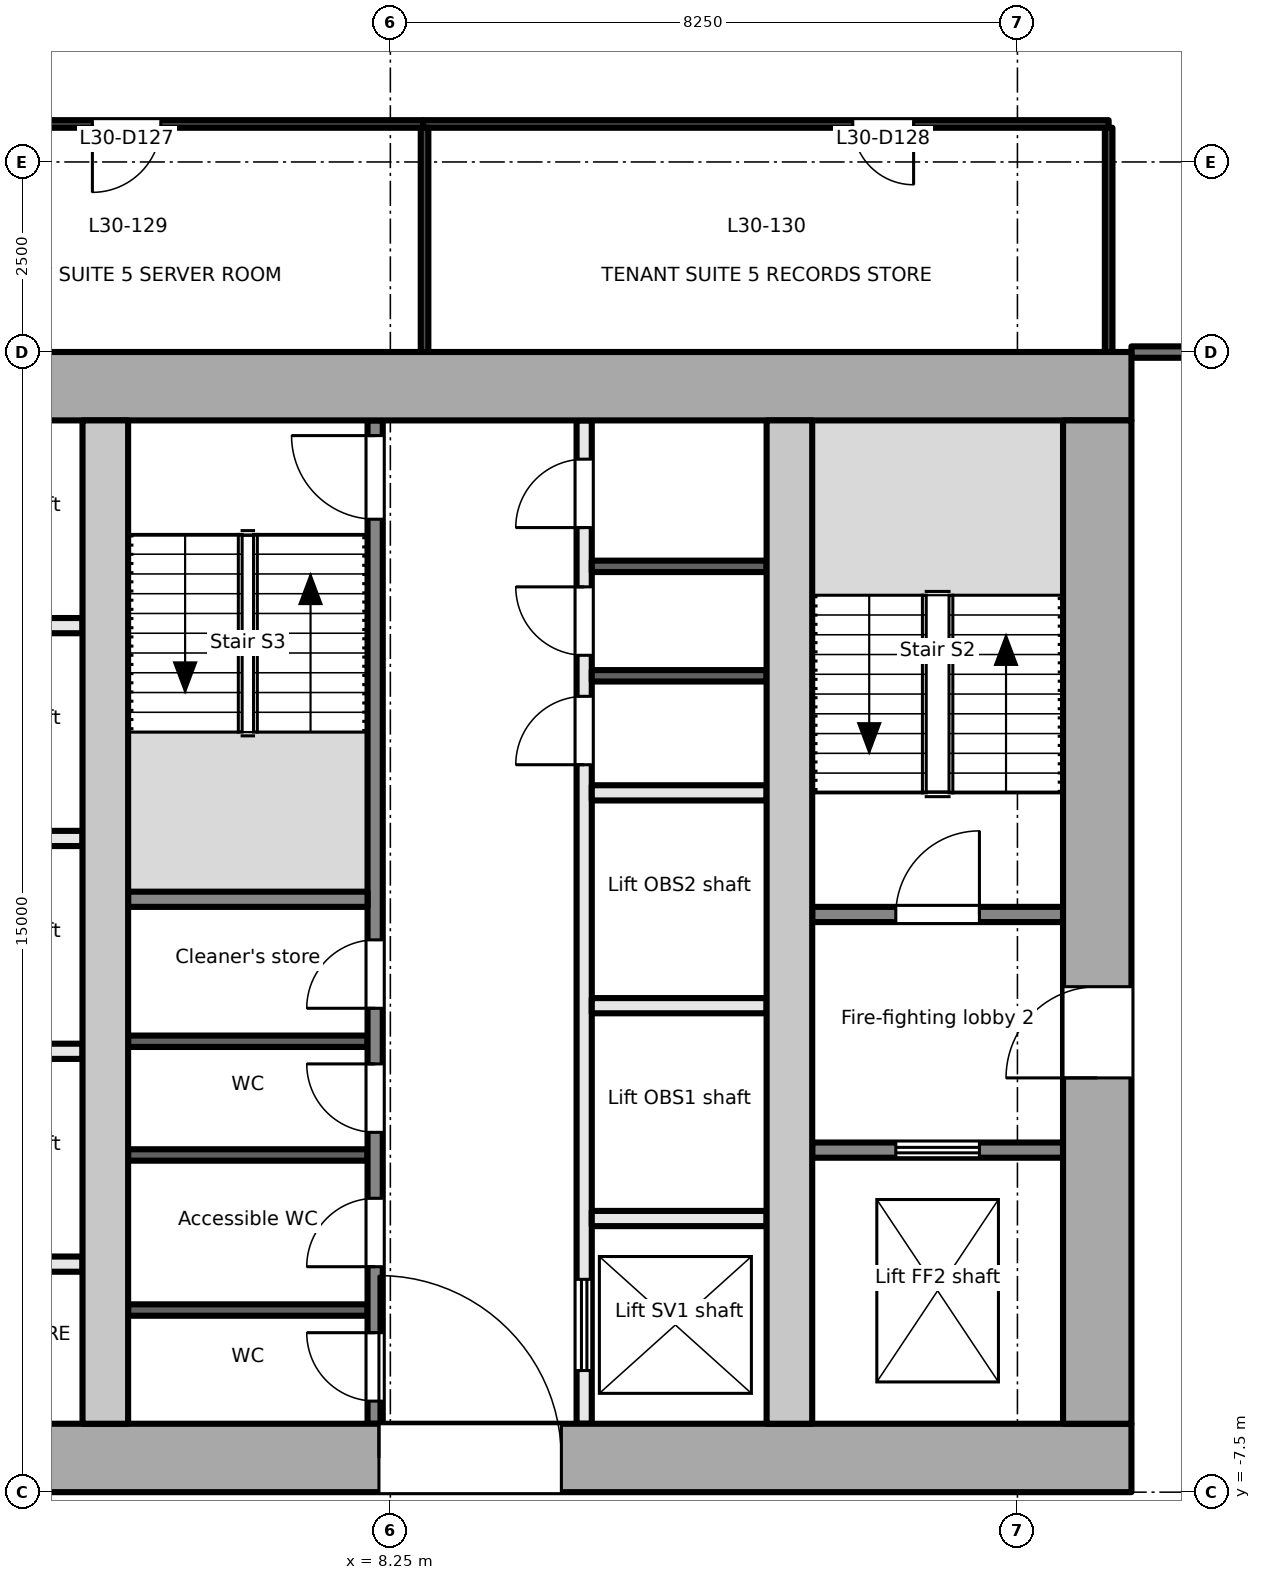
"""IFC4 building model, lengths in metres.
Left out: names, types, materials, properties, quantities, classifications, styles, units other than length and angle.
Written with IfcOpenShell. Run it as: python <this file> out.ifc"""

import sys

from ifc_helpers import new_model, si_unit, direction, frame, frame_2d, origin, place, context, subcontext, project, spatial, rectangle, extrude, element, fill, save


model = new_model("IFC4")
c1 = context("Model", 3, precision=1e-05, world=origin(), true_north=direction((0.0, 1.0)))
c2 = subcontext(c1, "Body", "Model", "MODEL_VIEW")
j1 = project(units=[si_unit("LENGTHUNIT", "METRE"), si_unit("PLANEANGLEUNIT", "RADIAN")], contexts=[c1])
p1 = place(None, origin())
s1 = spatial("IfcSite", under=j1, at=p1, CompositionType="ELEMENT")
p2 = place(p1, origin())
s2 = spatial("IfcBuilding", under=s1, at=p2, CompositionType="ELEMENT")
p3 = place(p2, frame((0.0, 0.0, 134.1)))
s3 = spatial("IfcBuildingStorey", under=s2, at=p3, CompositionType="ELEMENT", Elevation=134.1)
p4 = place(p3, frame((-18.0, -7.05, -0.2), z_axis=(0.0, 0.0, 1.0), x_axis=(1.0, 0.0, 0.0)))
e1 = element("IfcWall", 1, at=p4, inside=s3, PredefinedType="SHEAR", context=c2, shape_type="SweptSolid", body=[
    extrude(rectangle(XDim=36.0, YDim=0.9, at=frame_2d((18.0, 0.0))), origin(), (0.0, 0.0, 1.0), 4.0),
])
p5 = place(p4, frame((7.8, 0.0, 0.2)))
e2 = element("IfcOpeningElement", 2, at=p5, cuts=e1, PredefinedType="OPENING", context=c2, shape_type="SweptSolid", body=[
    extrude(rectangle(XDim=2.4, YDim=2.1, at=frame_2d((1.2, 1.05))), frame((0.0, 0.46, 0.0), z_axis=(0.0, -1.0, 0.0), x_axis=(1.0, 0.0, 0.0)), (0.0, 0.0, 1.0), 0.921),
])
p6 = place(p4, frame((17.4, 0.0, 0.2)))
e3 = element("IfcOpeningElement", 3, at=p6, cuts=e1, PredefinedType="OPENING", context=c2, shape_type="SweptSolid", body=[
    extrude(rectangle(XDim=1.2, YDim=2.1, at=frame_2d((0.6, 1.05))), frame((0.0, 0.46, 0.0), z_axis=(0.0, -1.0, 0.0), x_axis=(1.0, 0.0, 0.0)), (0.0, 0.0, 1.0), 0.921),
])
p7 = place(p4, frame((26.1, 0.0, 0.2)))
e4 = element("IfcOpeningElement", 4, at=p7, cuts=e1, PredefinedType="OPENING", context=c2, shape_type="SweptSolid", body=[
    extrude(rectangle(XDim=2.4, YDim=2.1, at=frame_2d((1.2, 1.05))), frame((0.0, 0.46, 0.0), z_axis=(0.0, -1.0, 0.0), x_axis=(1.0, 0.0, 0.0)), (0.0, 0.0, 1.0), 0.921),
])
p8 = place(p3, frame((-18.0, 7.05, -0.2), z_axis=(0.0, 0.0, 1.0), x_axis=(1.0, 0.0, 0.0)))
e5 = element("IfcWall", 5, at=p8, inside=s3, PredefinedType="SHEAR", context=c2, shape_type="SweptSolid", body=[
    extrude(rectangle(XDim=36.0, YDim=0.9, at=frame_2d((18.0, 0.0))), origin(), (0.0, 0.0, 1.0), 4.0),
])
p9 = place(p3, frame((17.55, -6.6, -0.2), z_axis=(0.0, 0.0, 1.0), x_axis=(0.0, 1.0, 0.0)))
e6 = element("IfcWall", 6, at=p9, inside=s3, PredefinedType="SHEAR", context=c2, shape_type="SweptSolid", body=[
    extrude(rectangle(XDim=13.2, YDim=0.9, at=frame_2d((6.6, 0.0))), origin(), (0.0, 0.0, 1.0), 4.0),
])
p10 = place(p9, frame((4.55, 0.0, 0.2)))
e7 = element("IfcOpeningElement", 7, at=p10, cuts=e6, PredefinedType="OPENING", context=c2, shape_type="SweptSolid", body=[
    extrude(rectangle(XDim=1.2, YDim=2.1, at=frame_2d((0.6, 1.05))), frame((0.0, 0.46, 0.0), z_axis=(0.0, -1.0, 0.0), x_axis=(1.0, 0.0, 0.0)), (0.0, 0.0, 1.0), 0.921),
])
for number, where, z_axis, x_axis in (
    (8, (4.5, -6.6, -0.2), (0.0, 0.0, 1.0), (0.0, 1.0, 0.0)),
    (9, (13.5, -6.6, -0.2), (0.0, 0.0, 1.0), (0.0, 1.0, 0.0)),
):
    element("IfcWall", number, at=place(p3, frame(where, z_axis=z_axis, x_axis=x_axis)), inside=s3, PredefinedType="SHEAR", context=c2, shape_type="SweptSolid", body=[
        extrude(rectangle(XDim=13.2, YDim=0.6, at=frame_2d((6.6, 0.0))), origin(), (0.0, 0.0, 1.0), 4.0),
    ])
p11 = place(p3, frame((13.8, -3.0, 0.0), z_axis=(0.0, 0.0, 1.0), x_axis=(1.0, 0.0, 0.0)))
e10 = element("IfcWall", 10, at=p11, inside=s3, PredefinedType="PARTITIONING", context=c2, shape_type="SweptSolid", body=[
    extrude(rectangle(XDim=3.3, YDim=0.2, at=frame_2d((1.65, 0.0))), origin(), (0.0, 0.0, 1.0), 3.8),
])
p12 = place(p11, frame((1.1, 0.0, 0.0)))
e11 = element("IfcOpeningElement", 11, at=p12, cuts=e10, PredefinedType="OPENING", context=c2, shape_type="SweptSolid", body=[
    extrude(rectangle(XDim=1.1, YDim=2.1, at=frame_2d((0.55, 1.05))), frame((0.0, 0.111, 0.0), z_axis=(0.0, -1.0, 0.0), x_axis=(1.0, 0.0, 0.0)), (0.0, 0.0, 1.0), 0.221),
])
p13 = place(p3, frame((13.8, 0.1, 0.0), z_axis=(0.0, 0.0, 1.0), x_axis=(1.0, 0.0, 0.0)))
e12 = element("IfcWall", 12, at=p13, inside=s3, PredefinedType="PARTITIONING", context=c2, shape_type="SweptSolid", body=[
    extrude(rectangle(XDim=3.3, YDim=0.2, at=frame_2d((1.65, 0.0))), origin(), (0.0, 0.0, 1.0), 3.8),
])
p14 = place(p13, frame((1.1, 0.0, 0.0)))
e13 = element("IfcOpeningElement", 13, at=p14, cuts=e12, PredefinedType="OPENING", context=c2, shape_type="SweptSolid", body=[
    extrude(rectangle(XDim=1.1, YDim=2.1, at=frame_2d((0.55, 1.05))), frame((0.0, 0.111, 0.0), z_axis=(0.0, -1.0, 0.0), x_axis=(1.0, 0.0, 0.0)), (0.0, 0.0, 1.0), 0.221),
])
for number, where, z_axis, x_axis in (
    (14, (1.9, -1.7, 0.0), (0.0, 0.0, 1.0), (1.0, 0.0, 0.0)),
    (15, (1.9, 1.1, 0.0), (0.0, 0.0, 1.0), (1.0, 0.0, 0.0)),
    (16, (1.9, 3.9, 0.0), (0.0, 0.0, 1.0), (1.0, 0.0, 0.0)),
    (17, (1.9, -4.5, 0.0), (0.0, 0.0, 1.0), (1.0, 0.0, 0.0)),
):
    element("IfcWall", number, at=place(p3, frame(where, z_axis=z_axis, x_axis=x_axis)), inside=s3, PredefinedType="PARTITIONING", context=c2, shape_type="SweptSolid", body=[
        extrude(rectangle(XDim=2.3, YDim=0.2, at=frame_2d((1.15, 0.0))), origin(), (0.0, 0.0, 1.0), 3.8),
    ])
p15 = place(p3, frame((8.05, -6.6, 0.0), z_axis=(0.0, 0.0, 1.0), x_axis=(0.0, 1.0, 0.0)))
e18 = element("IfcWall", 18, at=p15, inside=s3, PredefinedType="PARTITIONING", context=c2, shape_type="SweptSolid", body=[
    extrude(rectangle(XDim=13.2, YDim=0.2, at=frame_2d((6.6, 0.0))), origin(), (0.0, 0.0, 1.0), 3.8),
])
p16 = place(p15, frame((0.298, 0.0, 0.0)))
e19 = element("IfcOpeningElement", 19, at=p16, cuts=e18, PredefinedType="OPENING", context=c2, shape_type="SweptSolid", body=[
    extrude(rectangle(XDim=0.9, YDim=2.1, at=frame_2d((0.45, 1.05))), frame((0.0, 0.111, 0.0), z_axis=(0.0, -1.0, 0.0), x_axis=(1.0, 0.0, 0.0)), (0.0, 0.0, 1.0), 0.221),
])
p17 = place(p15, frame((2.066, 0.0, 0.0)))
e20 = element("IfcOpeningElement", 20, at=p17, cuts=e18, PredefinedType="OPENING", context=c2, shape_type="SweptSolid", body=[
    extrude(rectangle(XDim=0.9, YDim=2.1, at=frame_2d((0.45, 1.05))), frame((0.0, 0.111, 0.0), z_axis=(0.0, -1.0, 0.0), x_axis=(1.0, 0.0, 0.0)), (0.0, 0.0, 1.0), 0.221),
])
p18 = place(p15, frame((3.834, 0.0, 0.0)))
e21 = element("IfcOpeningElement", 21, at=p18, cuts=e18, PredefinedType="OPENING", context=c2, shape_type="SweptSolid", body=[
    extrude(rectangle(XDim=0.9, YDim=2.1, at=frame_2d((0.45, 1.05))), frame((0.0, 0.111, 0.0), z_axis=(0.0, -1.0, 0.0), x_axis=(1.0, 0.0, 0.0)), (0.0, 0.0, 1.0), 0.221),
])
p19 = place(p15, frame((5.466, 0.0, 0.0)))
e22 = element("IfcOpeningElement", 22, at=p19, cuts=e18, PredefinedType="OPENING", context=c2, shape_type="SweptSolid", body=[
    extrude(rectangle(XDim=0.9, YDim=2.1, at=frame_2d((0.45, 1.05))), frame((0.0, 0.111, 0.0), z_axis=(0.0, -1.0, 0.0), x_axis=(1.0, 0.0, 0.0)), (0.0, 0.0, 1.0), 0.221),
])
p20 = place(p15, frame((11.9, 0.0, 0.0)))
e23 = element("IfcOpeningElement", 23, at=p20, cuts=e18, PredefinedType="OPENING", context=c2, shape_type="SweptSolid", body=[
    extrude(rectangle(XDim=1.1, YDim=2.1, at=frame_2d((0.55, 1.05))), frame((0.0, 0.111, 0.0), z_axis=(0.0, -1.0, 0.0), x_axis=(1.0, 0.0, 0.0)), (0.0, 0.0, 1.0), 0.221),
])
p21 = place(p3, frame((10.8, -6.6, 0.0), z_axis=(0.0, 0.0, 1.0), x_axis=(0.0, 1.0, 0.0)))
e24 = element("IfcWall", 24, at=p21, inside=s3, PredefinedType="PARTITIONING", context=c2, shape_type="SweptSolid", body=[
    extrude(rectangle(XDim=13.2, YDim=0.2, at=frame_2d((6.6, 0.0))), origin(), (0.0, 0.0, 1.0), 3.8),
])
p22 = place(p21, frame((0.7, 0.0, 0.0)))
e25 = element("IfcOpeningElement", 25, at=p22, cuts=e24, PredefinedType="OPENING", context=c2, shape_type="SweptSolid", body=[
    extrude(rectangle(XDim=1.2, YDim=2.1, at=frame_2d((0.6, 1.05))), frame((0.0, 0.111, 0.0), z_axis=(0.0, -1.0, 0.0), x_axis=(1.0, 0.0, 0.0)), (0.0, 0.0, 1.0), 0.221),
])
p23 = place(p21, frame((8.67, 0.0, 0.0)))
e26 = element("IfcOpeningElement", 26, at=p23, cuts=e24, PredefinedType="OPENING", context=c2, shape_type="SweptSolid", body=[
    extrude(rectangle(XDim=0.9, YDim=2.1, at=frame_2d((0.45, 1.05))), frame((0.0, 0.111, 0.0), z_axis=(0.0, -1.0, 0.0), x_axis=(1.0, 0.0, 0.0)), (0.0, 0.0, 1.0), 0.221),
])
p24 = place(p21, frame((10.11, 0.0, 0.0)))
e27 = element("IfcOpeningElement", 27, at=p24, cuts=e24, PredefinedType="OPENING", context=c2, shape_type="SweptSolid", body=[
    extrude(rectangle(XDim=0.9, YDim=2.1, at=frame_2d((0.45, 1.05))), frame((0.0, 0.111, 0.0), z_axis=(0.0, -1.0, 0.0), x_axis=(1.0, 0.0, 0.0)), (0.0, 0.0, 1.0), 0.221),
])
p25 = place(p21, frame((11.79, 0.0, 0.0)))
e28 = element("IfcOpeningElement", 28, at=p25, cuts=e24, PredefinedType="OPENING", context=c2, shape_type="SweptSolid", body=[
    extrude(rectangle(XDim=0.9, YDim=2.1, at=frame_2d((0.45, 1.05))), frame((0.0, 0.111, 0.0), z_axis=(0.0, -1.0, 0.0), x_axis=(1.0, 0.0, 0.0)), (0.0, 0.0, 1.0), 0.221),
])
p26 = place(p3, frame((4.8, 0.3, 0.0), z_axis=(0.0, 0.0, 1.0), x_axis=(1.0, 0.0, 0.0)))
e29 = element("IfcWall", 29, at=p26, inside=s3, PredefinedType="PARTITIONING", context=c2, shape_type="SweptSolid", body=[
    extrude(rectangle(XDim=3.15, YDim=0.2, at=frame_2d((1.575, 0.0))), origin(), (0.0, 0.0, 1.0), 3.8),
])
for number, where, z_axis, x_axis in (
    (30, (4.8, -5.104, 0.0), (0.0, 0.0, 1.0), (1.0, 0.0, 0.0)),
    (31, (4.8, -3.064, 0.0), (0.0, 0.0, 1.0), (1.0, 0.0, 0.0)),
    (32, (4.8, -1.568, 0.0), (0.0, 0.0, 1.0), (1.0, 0.0, 0.0)),
):
    element("IfcWall", number, at=place(p3, frame(where, z_axis=z_axis, x_axis=x_axis)), inside=s3, PredefinedType="PARTITIONING", context=c2, shape_type="SweptSolid", body=[
        extrude(rectangle(XDim=3.15, YDim=0.15, at=frame_2d((1.575, 0.0))), origin(), (0.0, 0.0, 1.0), 3.8),
    ])
for number, where, z_axis, x_axis in (
    (33, (10.9, -3.9, 0.0), (0.0, 0.0, 1.0), (1.0, 0.0, 0.0)),
    (34, (10.9, -1.1, 0.0), (0.0, 0.0, 1.0), (1.0, 0.0, 0.0)),
    (35, (10.9, 1.7, 0.0), (0.0, 0.0, 1.0), (1.0, 0.0, 0.0)),
):
    element("IfcWall", number, at=place(p3, frame(where, z_axis=z_axis, x_axis=x_axis)), inside=s3, PredefinedType="PARTITIONING", context=c2, shape_type="SweptSolid", body=[
        extrude(rectangle(XDim=2.3, YDim=0.2, at=frame_2d((1.15, 0.0))), origin(), (0.0, 0.0, 1.0), 3.8),
    ])
for number, where, z_axis, x_axis in (
    (36, (10.9, 3.24, 0.0), (0.0, 0.0, 1.0), (1.0, 0.0, 0.0)),
    (37, (10.9, 4.68, 0.0), (0.0, 0.0, 1.0), (1.0, 0.0, 0.0)),
):
    element("IfcWall", number, at=place(p3, frame(where, z_axis=z_axis, x_axis=x_axis)), inside=s3, PredefinedType="PARTITIONING", context=c2, shape_type="SweptSolid", body=[
        extrude(rectangle(XDim=2.3, YDim=0.15, at=frame_2d((1.15, 0.0))), origin(), (0.0, 0.0, 1.0), 3.8),
    ])
p27 = place(p3, frame((18.0, 7.499, 0.0), z_axis=(0.0, 0.0, 1.0), x_axis=(1.0, 0.0, 0.0)))
e38 = element("IfcWall", 38, at=p27, inside=s3, PredefinedType="PARTITIONING", context=c2, shape_type="SweptSolid", body=[
    extrude(rectangle(XDim=2.61, YDim=0.15, at=frame_2d((1.305, 0.0))), origin(), (0.0, 0.0, 1.0), 3.8),
])
p28 = place(p3, frame((8.68, 10.5, 0.0), z_axis=(0.0, 0.0, 1.0), x_axis=(-1.0, 0.0, 0.0)))
e39 = element("IfcWall", 39, at=p28, inside=s3, PredefinedType="PARTITIONING", context=c2, shape_type="SweptSolid", body=[
    extrude(rectangle(XDim=7.8, YDim=0.1, at=frame_2d((3.9, 0.0))), origin(), (0.0, 0.0, 1.0), 3.5),
])
p29 = place(p28, frame((3.45, 0.0, 0.0)))
e40 = element("IfcOpeningElement", 40, at=p29, cuts=e39, PredefinedType="OPENING", context=c2, shape_type="SweptSolid", body=[
    extrude(rectangle(XDim=0.9, YDim=2.1, at=frame_2d((0.45, 1.05))), frame((0.0, 0.061, 0.0), z_axis=(0.0, -1.0, 0.0), x_axis=(1.0, 0.0, 0.0)), (0.0, 0.0, 1.0), 0.121),
])
p30 = place(p3, frame((17.7, 10.5, 0.0), z_axis=(0.0, 0.0, 1.0), x_axis=(-1.0, 0.0, 0.0)))
e41 = element("IfcWall", 41, at=p30, inside=s3, PredefinedType="PARTITIONING", context=c2, shape_type="SweptSolid", body=[
    extrude(rectangle(XDim=9.02, YDim=0.1, at=frame_2d((4.51, 0.0))), origin(), (0.0, 0.0, 1.0), 3.5),
])
p31 = place(p30, frame((2.566, 0.0, 0.0)))
e42 = element("IfcOpeningElement", 42, at=p31, cuts=e41, PredefinedType="OPENING", context=c2, shape_type="SweptSolid", body=[
    extrude(rectangle(XDim=0.8, YDim=2.1, at=frame_2d((0.4, 1.05))), frame((0.0, 0.061, 0.0), z_axis=(0.0, -1.0, 0.0), x_axis=(1.0, 0.0, 0.0)), (0.0, 0.0, 1.0), 0.121),
])
for number, where, z_axis, x_axis in (
    (43, (17.7, 7.5, 0.0), (0.0, 0.0, 1.0), (0.0, 1.0, 0.0)),
    (44, (8.7, 10.45, 0.0), (0.0, 0.0, 1.0), (0.0, -1.0, 0.0)),
):
    element("IfcWall", number, at=place(p3, frame(where, z_axis=z_axis, x_axis=x_axis)), inside=s3, PredefinedType="PARTITIONING", context=c2, shape_type="SweptSolid", body=[
        extrude(rectangle(XDim=2.95, YDim=0.1, at=frame_2d((1.475, 0.0))), origin(), (0.0, 0.0, 1.0), 3.8),
    ])
p32 = place(p12, origin())
e45 = element("IfcDoor", 45, at=p32, inside=s3, OperationType="DOUBLE_DOOR_SLIDING", PredefinedType="DOOR", context=c2, shape_type="SweptSolid", body=[
    extrude(rectangle(XDim=1.1, YDim=2.1, at=frame_2d((0.55, 1.05))), frame((0.0, 0.025, 0.0), z_axis=(0.0, -1.0, 0.0), x_axis=(1.0, 0.0, 0.0)), (0.0, 0.0, 1.0), 0.05),
])
fill(e11, e45)
p33 = place(p10, origin())
e46 = element("IfcDoor", 46, at=p33, inside=s3, OperationType="SINGLE_SWING_LEFT", PredefinedType="DOOR", context=c2, shape_type="SweptSolid", body=[
    extrude(rectangle(XDim=1.2, YDim=2.1, at=frame_2d((0.6, 1.05))), frame((0.0, 0.025, 0.0), z_axis=(0.0, -1.0, 0.0), x_axis=(1.0, 0.0, 0.0)), (0.0, 0.0, 1.0), 0.05),
])
fill(e7, e46)
p34 = place(p14, origin())
e47 = element("IfcDoor", 47, at=p34, inside=s3, OperationType="SINGLE_SWING_RIGHT", PredefinedType="DOOR", context=c2, shape_type="SweptSolid", body=[
    extrude(rectangle(XDim=1.1, YDim=2.1, at=frame_2d((0.55, 1.05))), frame((0.0, 0.025, 0.0), z_axis=(0.0, -1.0, 0.0), x_axis=(1.0, 0.0, 0.0)), (0.0, 0.0, 1.0), 0.05),
])
fill(e13, e47)
p35 = place(p16, origin())
e48 = element("IfcDoor", 48, at=p35, inside=s3, OperationType="SINGLE_SWING_RIGHT", PredefinedType="DOOR", context=c2, shape_type="SweptSolid", body=[
    extrude(rectangle(XDim=0.9, YDim=2.1, at=frame_2d((0.45, 1.05))), frame((0.0, 0.025, 0.0), z_axis=(0.0, -1.0, 0.0), x_axis=(1.0, 0.0, 0.0)), (0.0, 0.0, 1.0), 0.05),
])
fill(e19, e48)
p36 = place(p17, origin())
e49 = element("IfcDoor", 49, at=p36, inside=s3, OperationType="SINGLE_SWING_LEFT", PredefinedType="DOOR", context=c2, shape_type="SweptSolid", body=[
    extrude(rectangle(XDim=0.9, YDim=2.1, at=frame_2d((0.45, 1.05))), frame((0.0, 0.025, 0.0), z_axis=(0.0, -1.0, 0.0), x_axis=(1.0, 0.0, 0.0)), (0.0, 0.0, 1.0), 0.05),
])
fill(e20, e49)
p37 = place(p18, origin())
e50 = element("IfcDoor", 50, at=p37, inside=s3, OperationType="SINGLE_SWING_RIGHT", PredefinedType="DOOR", context=c2, shape_type="SweptSolid", body=[
    extrude(rectangle(XDim=0.9, YDim=2.1, at=frame_2d((0.45, 1.05))), frame((0.0, 0.025, 0.0), z_axis=(0.0, -1.0, 0.0), x_axis=(1.0, 0.0, 0.0)), (0.0, 0.0, 1.0), 0.05),
])
fill(e21, e50)
p38 = place(p19, origin())
e51 = element("IfcDoor", 51, at=p38, inside=s3, OperationType="SINGLE_SWING_LEFT", PredefinedType="DOOR", context=c2, shape_type="SweptSolid", body=[
    extrude(rectangle(XDim=0.9, YDim=2.1, at=frame_2d((0.45, 1.05))), frame((0.0, 0.025, 0.0), z_axis=(0.0, -1.0, 0.0), x_axis=(1.0, 0.0, 0.0)), (0.0, 0.0, 1.0), 0.05),
])
fill(e22, e51)
p39 = place(p20, origin())
e52 = element("IfcDoor", 52, at=p39, inside=s3, OperationType="SINGLE_SWING_RIGHT", PredefinedType="DOOR", context=c2, shape_type="SweptSolid", body=[
    extrude(rectangle(XDim=1.1, YDim=2.1, at=frame_2d((0.55, 1.05))), frame((0.0, 0.025, 0.0), z_axis=(0.0, -1.0, 0.0), x_axis=(1.0, 0.0, 0.0)), (0.0, 0.0, 1.0), 0.05),
])
fill(e23, e52)
p40 = place(p7, origin())
e53 = element("IfcDoor", 53, at=p40, inside=s3, OperationType="DOUBLE_DOOR_DOUBLE_SWING", PredefinedType="DOOR", context=c2, shape_type="SweptSolid", body=[
    extrude(rectangle(XDim=2.4, YDim=2.1, at=frame_2d((1.2, 1.05))), frame((0.0, 0.025, 0.0), z_axis=(0.0, -1.0, 0.0), x_axis=(1.0, 0.0, 0.0)), (0.0, 0.0, 1.0), 0.05),
])
fill(e4, e53)
p41 = place(p22, origin())
e54 = element("IfcDoor", 54, at=p41, inside=s3, OperationType="DOUBLE_DOOR_SLIDING", PredefinedType="DOOR", context=c2, shape_type="SweptSolid", body=[
    extrude(rectangle(XDim=1.2, YDim=2.1, at=frame_2d((0.6, 1.05))), frame((0.0, 0.025, 0.0), z_axis=(0.0, -1.0, 0.0), x_axis=(1.0, 0.0, 0.0)), (0.0, 0.0, 1.0), 0.05),
])
fill(e25, e54)
p42 = place(p23, origin())
e55 = element("IfcDoor", 55, at=p42, inside=s3, OperationType="SINGLE_SWING_LEFT", PredefinedType="DOOR", context=c2, shape_type="SweptSolid", body=[
    extrude(rectangle(XDim=0.9, YDim=2.1, at=frame_2d((0.45, 1.05))), frame((0.0, 0.025, 0.0), z_axis=(0.0, -1.0, 0.0), x_axis=(1.0, 0.0, 0.0)), (0.0, 0.0, 1.0), 0.05),
])
fill(e26, e55)
p43 = place(p24, origin())
e56 = element("IfcDoor", 56, at=p43, inside=s3, OperationType="SINGLE_SWING_RIGHT", PredefinedType="DOOR", context=c2, shape_type="SweptSolid", body=[
    extrude(rectangle(XDim=0.9, YDim=2.1, at=frame_2d((0.45, 1.05))), frame((0.0, 0.025, 0.0), z_axis=(0.0, -1.0, 0.0), x_axis=(1.0, 0.0, 0.0)), (0.0, 0.0, 1.0), 0.05),
])
fill(e27, e56)
p44 = place(p25, origin())
e57 = element("IfcDoor", 57, at=p44, inside=s3, OperationType="SINGLE_SWING_LEFT", PredefinedType="DOOR", context=c2, shape_type="SweptSolid", body=[
    extrude(rectangle(XDim=0.9, YDim=2.1, at=frame_2d((0.45, 1.05))), frame((0.0, 0.025, 0.0), z_axis=(0.0, -1.0, 0.0), x_axis=(1.0, 0.0, 0.0)), (0.0, 0.0, 1.0), 0.05),
])
fill(e28, e57)
p45 = place(p29, origin())
e58 = element("IfcDoor", 58, at=p45, inside=s3, OperationType="SINGLE_SWING_RIGHT", PredefinedType="DOOR", context=c2, shape_type="SweptSolid", body=[
    extrude(rectangle(XDim=0.9, YDim=2.1, at=frame_2d((0.45, 1.05))), frame((0.0, 0.025, 0.0), z_axis=(0.0, -1.0, 0.0), x_axis=(1.0, 0.0, 0.0)), (0.0, 0.0, 1.0), 0.05),
])
fill(e40, e58)
p46 = place(p31, origin())
e59 = element("IfcDoor", 59, at=p46, inside=s3, OperationType="SINGLE_SWING_LEFT", PredefinedType="DOOR", context=c2, shape_type="SweptSolid", body=[
    extrude(rectangle(XDim=0.8, YDim=2.1, at=frame_2d((0.4, 1.05))), frame((0.0, 0.025, 0.0), z_axis=(0.0, -1.0, 0.0), x_axis=(1.0, 0.0, 0.0)), (0.0, 0.0, 1.0), 0.05),
])
fill(e42, e59)
save(model, sys.argv[1])
